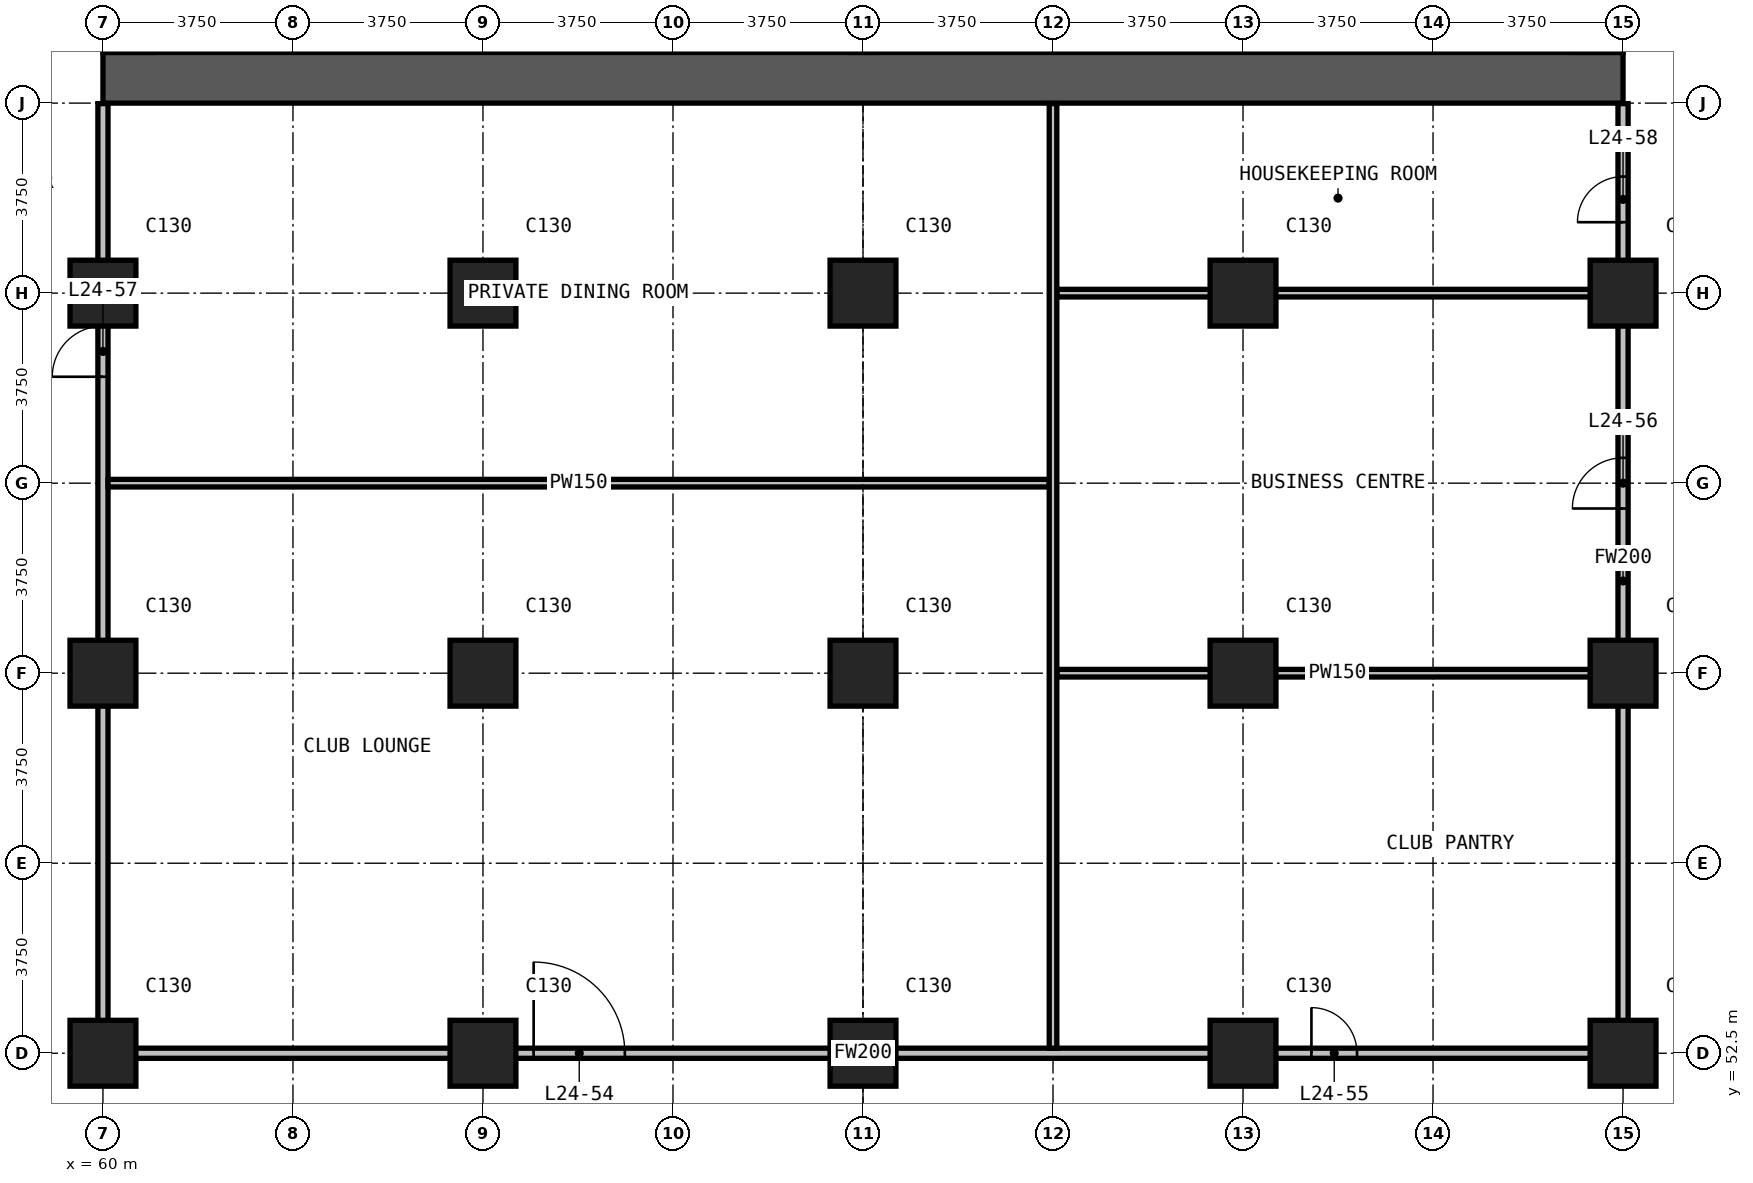
"""IFC4 building model, lengths in metres.
Left out: names, types, materials, properties, quantities, classifications, styles, units other than length and angle.
Written with IfcOpenShell. Run it as: python <this file> out.ifc"""

import sys

from ifc_helpers import new_model, si_unit, direction, frame, frame_2d, origin, origin_2d, place, context, subcontext, project, spatial, rectangle, extrude, element, fill, save


model = new_model("IFC4")
c1 = context("Model", 3, precision=1e-05, world=origin(), true_north=direction((0.0, 1.0)))
c2 = subcontext(c1, "Body", "Model", "MODEL_VIEW")
j1 = project(units=[si_unit("LENGTHUNIT", "METRE"), si_unit("PLANEANGLEUNIT", "RADIAN")], contexts=[c1])
p1 = place(None, origin())
s1 = spatial("IfcSite", under=j1, at=p1, CompositionType="ELEMENT")
p2 = place(p1, origin())
s2 = spatial("IfcBuilding", under=s1, at=p2, CompositionType="ELEMENT")
p3 = place(p2, frame((0.0, 0.0, 98.9)))
s3 = spatial("IfcBuildingStorey", under=s2, at=p3, CompositionType="ELEMENT", Elevation=98.9)
for number, where, z_axis, x_axis in (
    (1, (60.0, 52.5, 0.0), (0.0, 0.0, 1.0), (1.0, 0.0, 0.0)),
    (2, (60.0, 60.0, 0.0), (0.0, 0.0, 1.0), (1.0, 0.0, 0.0)),
    (3, (60.0, 67.5, 0.0), (0.0, 0.0, 1.0), (1.0, 0.0, 0.0)),
    (4, (67.5, 52.5, 0.0), (0.0, 0.0, 1.0), (1.0, 0.0, 0.0)),
    (5, (67.5, 60.0, 0.0), (0.0, 0.0, 1.0), (1.0, 0.0, 0.0)),
    (6, (67.5, 67.5, 0.0), (0.0, 0.0, 1.0), (1.0, 0.0, 0.0)),
    (7, (75.0, 52.5, 0.0), (0.0, 0.0, 1.0), (1.0, 0.0, 0.0)),
    (8, (75.0, 60.0, 0.0), (0.0, 0.0, 1.0), (1.0, 0.0, 0.0)),
    (9, (75.0, 67.5, 0.0), (0.0, 0.0, 1.0), (1.0, 0.0, 0.0)),
    (10, (82.5, 52.5, 0.0), (0.0, 0.0, 1.0), (1.0, 0.0, 0.0)),
    (11, (82.5, 60.0, 0.0), (0.0, 0.0, 1.0), (1.0, 0.0, 0.0)),
    (12, (82.5, 67.5, 0.0), (0.0, 0.0, 1.0), (1.0, 0.0, 0.0)),
    (13, (90.0, 52.5, 0.0), (0.0, 0.0, 1.0), (1.0, 0.0, 0.0)),
    (14, (90.0, 60.0, 0.0), (0.0, 0.0, 1.0), (1.0, 0.0, 0.0)),
    (15, (90.0, 67.5, 0.0), (0.0, 0.0, 1.0), (1.0, 0.0, 0.0)),
):
    element("IfcColumn", number, at=place(p3, frame(where, z_axis=z_axis, x_axis=x_axis)), inside=s3, PredefinedType="COLUMN", context=c2, shape_type="SweptSolid", body=[
        extrude(rectangle(XDim=1.3, YDim=1.3, at=origin_2d()), origin(), (0.0, 0.0, 1.0), 3.3),
    ])
p4 = place(p3, frame((60.0, 71.75, 0.0), z_axis=(0.0, 0.0, 1.0), x_axis=(1.0, 0.0, 0.0)))
e16 = element("IfcWall", 16, at=p4, inside=s3, PredefinedType="SHEAR", context=c2, shape_type="SweptSolid", body=[
    extrude(rectangle(XDim=30.0, YDim=1.0, at=frame_2d((15.0, 0.0))), origin(), (0.0, 0.0, 1.0), 3.3),
])
p5 = place(p3, frame((60.1, 52.5, 0.0), z_axis=(0.0, 0.0, 1.0), x_axis=(1.0, 0.0, 0.0)))
e17 = element("IfcWall", 17, at=p5, inside=s3, PredefinedType="PARTITIONING", context=c2, shape_type="SweptSolid", body=[
    extrude(rectangle(XDim=29.8, YDim=0.2, at=frame_2d((14.9, 0.0))), origin(), (0.0, 0.0, 1.0), 2.95),
])
p6 = place(p5, frame((8.4, 0.0, 0.0)))
e18 = element("IfcOpeningElement", 18, at=p6, cuts=e17, PredefinedType="OPENING", context=c2, shape_type="SweptSolid", body=[
    extrude(rectangle(XDim=1.8, YDim=2.2, at=frame_2d((0.9, 1.1))), frame((0.0, 0.11, 0.0), z_axis=(0.0, -1.0, 0.0), x_axis=(1.0, 0.0, 0.0)), (0.0, 0.0, 1.0), 0.22),
])
p7 = place(p5, frame((23.75, 0.0, 0.0)))
e19 = element("IfcOpeningElement", 19, at=p7, cuts=e17, PredefinedType="OPENING", context=c2, shape_type="SweptSolid", body=[
    extrude(rectangle(XDim=0.9, YDim=2.2, at=frame_2d((0.45, 1.1))), frame((0.0, 0.11, 0.0), z_axis=(0.0, -1.0, 0.0), x_axis=(1.0, 0.0, 0.0)), (0.0, 0.0, 1.0), 0.22),
])
p8 = place(p3, frame((60.0, 52.4, 0.0), z_axis=(0.0, 0.0, 1.0), x_axis=(0.0, 1.0, 0.0)))
e20 = element("IfcWall", 20, at=p8, inside=s3, PredefinedType="PARTITIONING", context=c2, shape_type="SweptSolid", body=[
    extrude(rectangle(XDim=18.84, YDim=0.2, at=frame_2d((9.42, 0.0))), origin(), (0.0, 0.0, 1.0), 2.95),
])
p9 = place(p8, frame((13.45, 0.0, 0.0)))
e21 = element("IfcOpeningElement", 21, at=p9, cuts=e20, PredefinedType="OPENING", context=c2, shape_type="SweptSolid", body=[
    extrude(rectangle(XDim=1.0, YDim=2.2, at=frame_2d((0.5, 1.1))), frame((0.0, 0.11, 0.0), z_axis=(0.0, -1.0, 0.0), x_axis=(1.0, 0.0, 0.0)), (0.0, 0.0, 1.0), 0.22),
])
p10 = place(p3, frame((90.0, 52.4, 0.0), z_axis=(0.0, 0.0, 1.0), x_axis=(0.0, 1.0, 0.0)))
e22 = element("IfcWall", 22, at=p10, inside=s3, PredefinedType="PARTITIONING", context=c2, shape_type="SweptSolid", body=[
    extrude(rectangle(XDim=18.84, YDim=0.2, at=frame_2d((9.42, 0.0))), origin(), (0.0, 0.0, 1.0), 2.95),
])
p11 = place(p10, frame((10.85, 0.0, 0.0)))
e23 = element("IfcOpeningElement", 23, at=p11, cuts=e22, PredefinedType="OPENING", context=c2, shape_type="SweptSolid", body=[
    extrude(rectangle(XDim=1.0, YDim=2.2, at=frame_2d((0.5, 1.1))), frame((0.0, 0.11, 0.0), z_axis=(0.0, -1.0, 0.0), x_axis=(1.0, 0.0, 0.0)), (0.0, 0.0, 1.0), 0.22),
])
p12 = place(p10, frame((16.5, 0.0, 0.0)))
e24 = element("IfcOpeningElement", 24, at=p12, cuts=e22, PredefinedType="OPENING", context=c2, shape_type="SweptSolid", body=[
    extrude(rectangle(XDim=0.9, YDim=2.2, at=frame_2d((0.45, 1.1))), frame((0.0, 0.11, 0.0), z_axis=(0.0, -1.0, 0.0), x_axis=(1.0, 0.0, 0.0)), (0.0, 0.0, 1.0), 0.22),
])
p13 = place(p3, frame((78.825, 60.0, 0.0), z_axis=(0.0, 0.0, 1.0), x_axis=(1.0, 0.0, 0.0)))
e25 = element("IfcWall", 25, at=p13, inside=s3, PredefinedType="PARTITIONING", context=c2, shape_type="SweptSolid", body=[
    extrude(rectangle(XDim=11.075, YDim=0.15, at=frame_2d((5.538, 0.0))), origin(), (0.0, 0.0, 1.0), 2.95),
])
p14 = place(p3, frame((60.1, 63.75, 0.0), z_axis=(0.0, 0.0, 1.0), x_axis=(1.0, 0.0, 0.0)))
e26 = element("IfcWall", 26, at=p14, inside=s3, PredefinedType="PARTITIONING", context=c2, shape_type="SweptSolid", body=[
    extrude(rectangle(XDim=18.575, YDim=0.15, at=frame_2d((9.288, 0.0))), origin(), (0.0, 0.0, 1.0), 2.95),
])
p15 = place(p3, frame((78.825, 67.5, 0.0), z_axis=(0.0, 0.0, 1.0), x_axis=(1.0, 0.0, 0.0)))
e27 = element("IfcWall", 27, at=p15, inside=s3, PredefinedType="PARTITIONING", context=c2, shape_type="SweptSolid", body=[
    extrude(rectangle(XDim=11.075, YDim=0.15, at=frame_2d((5.538, 0.0))), origin(), (0.0, 0.0, 1.0), 2.95),
])
p16 = place(p3, frame((78.75, 52.6, 0.0), z_axis=(0.0, 0.0, 1.0), x_axis=(0.0, 1.0, 0.0)))
e28 = element("IfcWall", 28, at=p16, inside=s3, PredefinedType="PARTITIONING", context=c2, shape_type="SweptSolid", body=[
    extrude(rectangle(XDim=18.64, YDim=0.15, at=frame_2d((9.32, 0.0))), origin(), (0.0, 0.0, 1.0), 2.95),
])
p17 = place(p6, origin())
e29 = element("IfcDoor", 29, at=p17, inside=s3, OperationType="DOUBLE_DOOR_SINGLE_SWING", PredefinedType="DOOR", context=c2, shape_type="SweptSolid", body=[
    extrude(rectangle(XDim=1.8, YDim=2.2, at=frame_2d((0.9, 1.1))), frame((0.0, 0.025, 0.0), z_axis=(0.0, -1.0, 0.0), x_axis=(1.0, 0.0, 0.0)), (0.0, 0.0, 1.0), 0.05),
])
fill(e18, e29)
p18 = place(p7, origin())
e30 = element("IfcDoor", 30, at=p18, inside=s3, OperationType="SINGLE_SWING_LEFT", PredefinedType="DOOR", context=c2, shape_type="SweptSolid", body=[
    extrude(rectangle(XDim=0.9, YDim=2.2, at=frame_2d((0.45, 1.1))), frame((0.0, 0.025, 0.0), z_axis=(0.0, -1.0, 0.0), x_axis=(1.0, 0.0, 0.0)), (0.0, 0.0, 1.0), 0.05),
])
fill(e19, e30)
p19 = place(p11, origin())
e31 = element("IfcDoor", 31, at=p19, inside=s3, OperationType="SINGLE_SWING_RIGHT", PredefinedType="DOOR", context=c2, shape_type="SweptSolid", body=[
    extrude(rectangle(XDim=1.0, YDim=2.2, at=frame_2d((0.5, 1.1))), frame((0.0, 0.025, 0.0), z_axis=(0.0, -1.0, 0.0), x_axis=(1.0, 0.0, 0.0)), (0.0, 0.0, 1.0), 0.05),
])
fill(e23, e31)
p20 = place(p9, origin())
e32 = element("IfcDoor", 32, at=p20, inside=s3, OperationType="SINGLE_SWING_LEFT", PredefinedType="DOOR", context=c2, shape_type="SweptSolid", body=[
    extrude(rectangle(XDim=1.0, YDim=2.2, at=frame_2d((0.5, 1.1))), frame((0.0, 0.025, 0.0), z_axis=(0.0, -1.0, 0.0), x_axis=(1.0, 0.0, 0.0)), (0.0, 0.0, 1.0), 0.05),
])
fill(e21, e32)
p21 = place(p12, origin())
e33 = element("IfcDoor", 33, at=p21, inside=s3, OperationType="SINGLE_SWING_LEFT", PredefinedType="DOOR", context=c2, shape_type="SweptSolid", body=[
    extrude(rectangle(XDim=0.9, YDim=2.2, at=frame_2d((0.45, 1.1))), frame((0.0, 0.025, 0.0), z_axis=(0.0, -1.0, 0.0), x_axis=(1.0, 0.0, 0.0)), (0.0, 0.0, 1.0), 0.05),
])
fill(e24, e33)
save(model, sys.argv[1])
